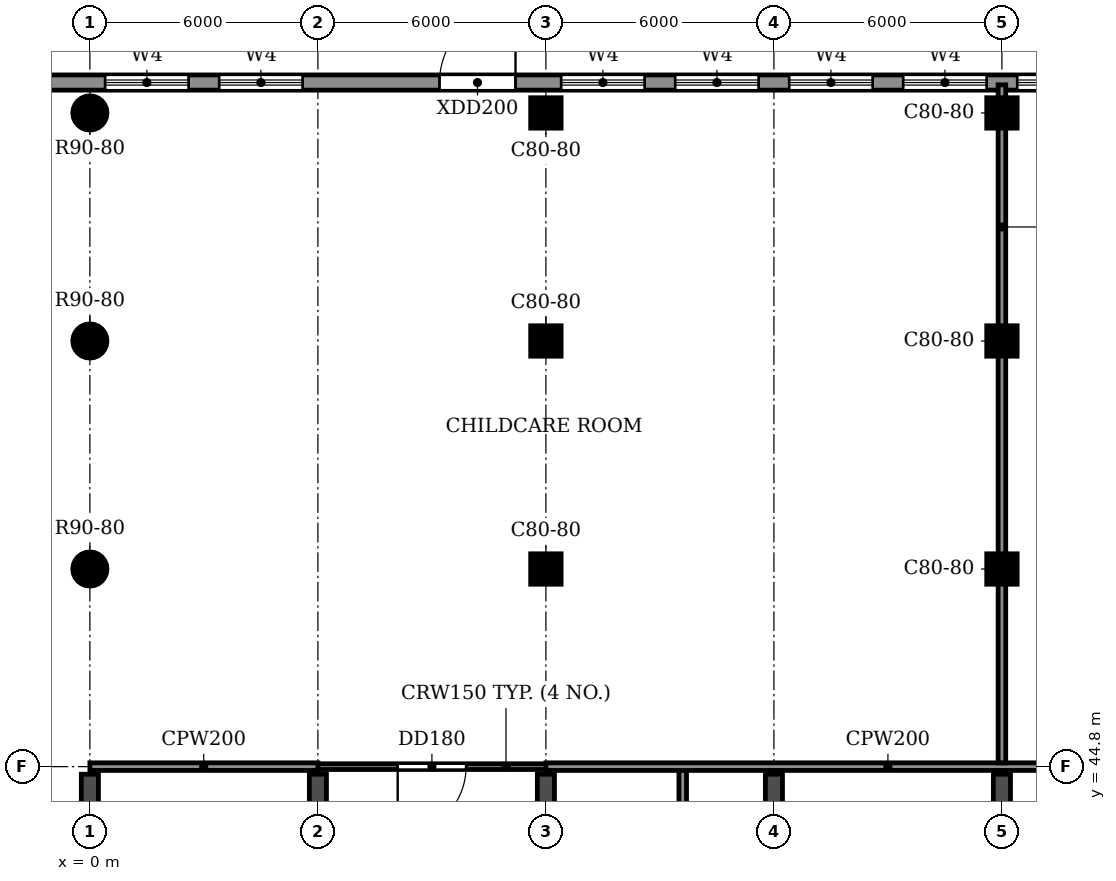
"""IFC4 building model, lengths in metres.
Left out: names, types, materials, properties, quantities, classifications, styles, units other than length and angle.
Written with IfcOpenShell. Run it as: python <this file> out.ifc"""

import sys

from ifc_helpers import new_model, si_unit, direction, frame, frame_2d, origin, origin_2d, place, context, subcontext, project, spatial, rectangle, circle, extrude, source, transform, mapped, element, fill, save


model = new_model("IFC4")
c1 = context("Model", 3, precision=1e-05, world=origin(), true_north=direction((0.0, 1.0)))
c2 = subcontext(c1, "Body", "Model", "MODEL_VIEW")
j1 = project(units=[si_unit("LENGTHUNIT", "METRE"), si_unit("PLANEANGLEUNIT", "RADIAN")], contexts=[c1])
p1 = place(None, origin())
s1 = spatial("IfcSite", under=j1, at=p1, CompositionType="ELEMENT")
p2 = place(p1, origin())
s2 = spatial("IfcBuilding", under=s1, at=p2, CompositionType="ELEMENT")
p3 = place(p2, frame((0.0, 0.0, 10.8)))
s3 = spatial("IfcBuildingStorey", under=s2, at=p3, CompositionType="ELEMENT", Elevation=10.8)
for number, where, z_axis, x_axis in (
    (1, (0.0, 30.55, 0.0), (0.0, 0.0, 1.0), (0.0, 1.0, 0.0)),
    (2, (6.0, 30.55, 0.0), (0.0, 0.0, 1.0), (0.0, 1.0, 0.0)),
    (3, (12.0, 30.55, 0.0), (0.0, 0.0, 1.0), (0.0, 1.0, 0.0)),
    (4, (18.0, 30.55, 0.0), (0.0, 0.0, 1.0), (0.0, 1.0, 0.0)),
    (5, (24.0, 30.55, 0.0), (0.0, 0.0, 1.0), (0.0, 1.0, 0.0)),
):
    element("IfcWall", number, at=place(p3, frame(where, z_axis=z_axis, x_axis=x_axis)), inside=s3, PredefinedType="SHEAR", context=c2, shape_type="SweptSolid", body=[
        extrude(rectangle(XDim=14.05, YDim=0.45, at=frame_2d((7.025, 0.0))), origin(), (0.0, 0.0, 1.0), 3.92),
    ])
m1 = source(origin(), c2, "Body", "SweptSolid", [
    extrude(circle(Radius=0.45, at=origin_2d()), origin(), (0.0, 0.0, 1.0), 3.92),
])
p4 = place(p3, frame((0.0, 62.0, 0.0), z_axis=(0.0, 0.0, 1.0), x_axis=(1.0, 0.0, 0.0)))
e6 = element("IfcColumn", 6, at=p4, inside=s3, PredefinedType="COLUMN", context=c2, shape_type="MappedRepresentation", body=[
    mapped(m1, transform((0.0, 0.0, 0.0))),
])
m2 = source(origin(), c2, "Body", "SweptSolid", [
    extrude(rectangle(XDim=0.8, YDim=0.8, at=origin_2d()), origin(), (0.0, 0.0, 1.0), 3.92),
])
for number, where, z_axis, x_axis in (
    (7, (12.0, 62.0, 0.0), (0.0, 0.0, 1.0), (1.0, 0.0, 0.0)),
    (8, (24.0, 62.0, 0.0), (0.0, 0.0, 1.0), (1.0, 0.0, 0.0)),
):
    element("IfcColumn", number, at=place(p3, frame(where, z_axis=z_axis, x_axis=x_axis)), inside=s3, PredefinedType="COLUMN", context=c2, shape_type="MappedRepresentation", body=[
        mapped(m2, transform((0.0, 0.0, 0.0))),
    ])
p5 = place(p3, frame((0.0, 56.0, 0.0), z_axis=(0.0, 0.0, 1.0), x_axis=(1.0, 0.0, 0.0)))
e9 = element("IfcColumn", 9, at=p5, inside=s3, PredefinedType="COLUMN", context=c2, shape_type="MappedRepresentation", body=[
    mapped(m1, transform((0.0, 0.0, 0.0))),
])
for number, where, z_axis, x_axis in (
    (10, (12.0, 56.0, 0.0), (0.0, 0.0, 1.0), (1.0, 0.0, 0.0)),
    (11, (24.0, 56.0, 0.0), (0.0, 0.0, 1.0), (1.0, 0.0, 0.0)),
):
    element("IfcColumn", number, at=place(p3, frame(where, z_axis=z_axis, x_axis=x_axis)), inside=s3, PredefinedType="COLUMN", context=c2, shape_type="MappedRepresentation", body=[
        mapped(m2, transform((0.0, 0.0, 0.0))),
    ])
p6 = place(p3, frame((0.0, 50.0, 0.0), z_axis=(0.0, 0.0, 1.0), x_axis=(1.0, 0.0, 0.0)))
e12 = element("IfcColumn", 12, at=p6, inside=s3, PredefinedType="COLUMN", context=c2, shape_type="MappedRepresentation", body=[
    mapped(m1, transform((0.0, 0.0, 0.0))),
])
for number, where, z_axis, x_axis in (
    (13, (12.0, 50.0, 0.0), (0.0, 0.0, 1.0), (1.0, 0.0, 0.0)),
    (14, (24.0, 50.0, 0.0), (0.0, 0.0, 1.0), (1.0, 0.0, 0.0)),
):
    element("IfcColumn", number, at=place(p3, frame(where, z_axis=z_axis, x_axis=x_axis)), inside=s3, PredefinedType="COLUMN", context=c2, shape_type="MappedRepresentation", body=[
        mapped(m2, transform((0.0, 0.0, 0.0))),
    ])
p7 = place(p3, frame((105.0, 62.8, 0.0), z_axis=(0.0, 0.0, 1.0), x_axis=(-1.0, 0.0, 0.0)))
e15 = element("IfcWall", 15, at=p7, inside=s3, PredefinedType="STANDARD", context=c2, shape_type="SweptSolid", body=[
    extrude(rectangle(XDim=108.0, YDim=0.4, at=frame_2d((54.0, 0.0))), origin(), (0.0, 0.0, 1.0), 3.92),
])
p8 = place(p7, frame((102.4, 0.0, 0.9)))
e16 = element("IfcOpeningElement", 16, at=p8, cuts=e15, PredefinedType="OPENING", context=c2, shape_type="SweptSolid", body=[
    extrude(rectangle(XDim=2.2, YDim=2.7, at=frame_2d((1.1, 1.35))), frame((0.0, 0.21, 0.0), z_axis=(0.0, -1.0, 0.0), x_axis=(1.0, 0.0, 0.0)), (0.0, 0.0, 1.0), 0.42),
])
p9 = place(p7, frame((99.4, 0.0, 0.9)))
e17 = element("IfcOpeningElement", 17, at=p9, cuts=e15, PredefinedType="OPENING", context=c2, shape_type="SweptSolid", body=[
    extrude(rectangle(XDim=2.2, YDim=2.7, at=frame_2d((1.1, 1.35))), frame((0.0, 0.21, 0.0), z_axis=(0.0, -1.0, 0.0), x_axis=(1.0, 0.0, 0.0)), (0.0, 0.0, 1.0), 0.42),
])
p10 = place(p7, frame((90.4, 0.0, 0.9)))
e18 = element("IfcOpeningElement", 18, at=p10, cuts=e15, PredefinedType="OPENING", context=c2, shape_type="SweptSolid", body=[
    extrude(rectangle(XDim=2.2, YDim=2.7, at=frame_2d((1.1, 1.35))), frame((0.0, 0.21, 0.0), z_axis=(0.0, -1.0, 0.0), x_axis=(1.0, 0.0, 0.0)), (0.0, 0.0, 1.0), 0.42),
])
p11 = place(p7, frame((87.4, 0.0, 0.9)))
e19 = element("IfcOpeningElement", 19, at=p11, cuts=e15, PredefinedType="OPENING", context=c2, shape_type="SweptSolid", body=[
    extrude(rectangle(XDim=2.2, YDim=2.7, at=frame_2d((1.1, 1.35))), frame((0.0, 0.21, 0.0), z_axis=(0.0, -1.0, 0.0), x_axis=(1.0, 0.0, 0.0)), (0.0, 0.0, 1.0), 0.42),
])
p12 = place(p7, frame((84.4, 0.0, 0.9)))
e20 = element("IfcOpeningElement", 20, at=p12, cuts=e15, PredefinedType="OPENING", context=c2, shape_type="SweptSolid", body=[
    extrude(rectangle(XDim=2.2, YDim=2.7, at=frame_2d((1.1, 1.35))), frame((0.0, 0.21, 0.0), z_axis=(0.0, -1.0, 0.0), x_axis=(1.0, 0.0, 0.0)), (0.0, 0.0, 1.0), 0.42),
])
p13 = place(p7, frame((81.4, 0.0, 0.9)))
e21 = element("IfcOpeningElement", 21, at=p13, cuts=e15, PredefinedType="OPENING", context=c2, shape_type="SweptSolid", body=[
    extrude(rectangle(XDim=2.2, YDim=2.7, at=frame_2d((1.1, 1.35))), frame((0.0, 0.21, 0.0), z_axis=(0.0, -1.0, 0.0), x_axis=(1.0, 0.0, 0.0)), (0.0, 0.0, 1.0), 0.42),
])
p14 = place(p7, frame((78.4, 0.0, 0.9)))
e22 = element("IfcOpeningElement", 22, at=p14, cuts=e15, PredefinedType="OPENING", context=c2, shape_type="SweptSolid", body=[
    extrude(rectangle(XDim=2.2, YDim=2.7, at=frame_2d((1.1, 1.35))), frame((0.0, 0.21, 0.0), z_axis=(0.0, -1.0, 0.0), x_axis=(1.0, 0.0, 0.0)), (0.0, 0.0, 1.0), 0.42),
])
p15 = place(p7, frame((75.4, 0.0, 0.9)))
e23 = element("IfcOpeningElement", 23, at=p15, cuts=e15, PredefinedType="OPENING", context=c2, shape_type="SweptSolid", body=[
    extrude(rectangle(XDim=2.2, YDim=2.7, at=frame_2d((1.1, 1.35))), frame((0.0, 0.21, 0.0), z_axis=(0.0, -1.0, 0.0), x_axis=(1.0, 0.0, 0.0)), (0.0, 0.0, 1.0), 0.42),
])
p16 = place(p7, frame((66.4, 0.0, 0.9)))
e24 = element("IfcOpeningElement", 24, at=p16, cuts=e15, PredefinedType="OPENING", context=c2, shape_type="SweptSolid", body=[
    extrude(rectangle(XDim=2.2, YDim=2.7, at=frame_2d((1.1, 1.35))), frame((0.0, 0.21, 0.0), z_axis=(0.0, -1.0, 0.0), x_axis=(1.0, 0.0, 0.0)), (0.0, 0.0, 1.0), 0.42),
])
p17 = place(p7, frame((63.4, 0.0, 0.9)))
e25 = element("IfcOpeningElement", 25, at=p17, cuts=e15, PredefinedType="OPENING", context=c2, shape_type="SweptSolid", body=[
    extrude(rectangle(XDim=2.2, YDim=2.7, at=frame_2d((1.1, 1.35))), frame((0.0, 0.21, 0.0), z_axis=(0.0, -1.0, 0.0), x_axis=(1.0, 0.0, 0.0)), (0.0, 0.0, 1.0), 0.42),
])
p18 = place(p7, frame((60.4, 0.0, 0.9)))
e26 = element("IfcOpeningElement", 26, at=p18, cuts=e15, PredefinedType="OPENING", context=c2, shape_type="SweptSolid", body=[
    extrude(rectangle(XDim=2.2, YDim=2.7, at=frame_2d((1.1, 1.35))), frame((0.0, 0.21, 0.0), z_axis=(0.0, -1.0, 0.0), x_axis=(1.0, 0.0, 0.0)), (0.0, 0.0, 1.0), 0.42),
])
p19 = place(p7, frame((57.4, 0.0, 0.9)))
e27 = element("IfcOpeningElement", 27, at=p19, cuts=e15, PredefinedType="OPENING", context=c2, shape_type="SweptSolid", body=[
    extrude(rectangle(XDim=2.2, YDim=2.7, at=frame_2d((1.1, 1.35))), frame((0.0, 0.21, 0.0), z_axis=(0.0, -1.0, 0.0), x_axis=(1.0, 0.0, 0.0)), (0.0, 0.0, 1.0), 0.42),
])
p20 = place(p7, frame((54.4, 0.0, 0.9)))
e28 = element("IfcOpeningElement", 28, at=p20, cuts=e15, PredefinedType="OPENING", context=c2, shape_type="SweptSolid", body=[
    extrude(rectangle(XDim=2.2, YDim=2.7, at=frame_2d((1.1, 1.35))), frame((0.0, 0.21, 0.0), z_axis=(0.0, -1.0, 0.0), x_axis=(1.0, 0.0, 0.0)), (0.0, 0.0, 1.0), 0.42),
])
p21 = place(p7, frame((51.4, 0.0, 0.9)))
e29 = element("IfcOpeningElement", 29, at=p21, cuts=e15, PredefinedType="OPENING", context=c2, shape_type="SweptSolid", body=[
    extrude(rectangle(XDim=2.2, YDim=2.7, at=frame_2d((1.1, 1.35))), frame((0.0, 0.21, 0.0), z_axis=(0.0, -1.0, 0.0), x_axis=(1.0, 0.0, 0.0)), (0.0, 0.0, 1.0), 0.42),
])
p22 = place(p7, frame((48.4, 0.0, 0.9)))
e30 = element("IfcOpeningElement", 30, at=p22, cuts=e15, PredefinedType="OPENING", context=c2, shape_type="SweptSolid", body=[
    extrude(rectangle(XDim=2.2, YDim=2.7, at=frame_2d((1.1, 1.35))), frame((0.0, 0.21, 0.0), z_axis=(0.0, -1.0, 0.0), x_axis=(1.0, 0.0, 0.0)), (0.0, 0.0, 1.0), 0.42),
])
p23 = place(p7, frame((45.4, 0.0, 0.9)))
e31 = element("IfcOpeningElement", 31, at=p23, cuts=e15, PredefinedType="OPENING", context=c2, shape_type="SweptSolid", body=[
    extrude(rectangle(XDim=2.2, YDim=2.7, at=frame_2d((1.1, 1.35))), frame((0.0, 0.21, 0.0), z_axis=(0.0, -1.0, 0.0), x_axis=(1.0, 0.0, 0.0)), (0.0, 0.0, 1.0), 0.42),
])
p24 = place(p7, frame((42.4, 0.0, 0.9)))
e32 = element("IfcOpeningElement", 32, at=p24, cuts=e15, PredefinedType="OPENING", context=c2, shape_type="SweptSolid", body=[
    extrude(rectangle(XDim=2.2, YDim=2.7, at=frame_2d((1.1, 1.35))), frame((0.0, 0.21, 0.0), z_axis=(0.0, -1.0, 0.0), x_axis=(1.0, 0.0, 0.0)), (0.0, 0.0, 1.0), 0.42),
])
p25 = place(p7, frame((39.4, 0.0, 0.9)))
e33 = element("IfcOpeningElement", 33, at=p25, cuts=e15, PredefinedType="OPENING", context=c2, shape_type="SweptSolid", body=[
    extrude(rectangle(XDim=2.2, YDim=2.7, at=frame_2d((1.1, 1.35))), frame((0.0, 0.21, 0.0), z_axis=(0.0, -1.0, 0.0), x_axis=(1.0, 0.0, 0.0)), (0.0, 0.0, 1.0), 0.42),
])
p26 = place(p7, frame((36.4, 0.0, 0.9)))
e34 = element("IfcOpeningElement", 34, at=p26, cuts=e15, PredefinedType="OPENING", context=c2, shape_type="SweptSolid", body=[
    extrude(rectangle(XDim=2.2, YDim=2.7, at=frame_2d((1.1, 1.35))), frame((0.0, 0.21, 0.0), z_axis=(0.0, -1.0, 0.0), x_axis=(1.0, 0.0, 0.0)), (0.0, 0.0, 1.0), 0.42),
])
p27 = place(p7, frame((33.4, 0.0, 0.9)))
e35 = element("IfcOpeningElement", 35, at=p27, cuts=e15, PredefinedType="OPENING", context=c2, shape_type="SweptSolid", body=[
    extrude(rectangle(XDim=2.2, YDim=2.7, at=frame_2d((1.1, 1.35))), frame((0.0, 0.21, 0.0), z_axis=(0.0, -1.0, 0.0), x_axis=(1.0, 0.0, 0.0)), (0.0, 0.0, 1.0), 0.42),
])
p28 = place(p7, frame((30.4, 0.0, 0.9)))
e36 = element("IfcOpeningElement", 36, at=p28, cuts=e15, PredefinedType="OPENING", context=c2, shape_type="SweptSolid", body=[
    extrude(rectangle(XDim=2.2, YDim=2.7, at=frame_2d((1.1, 1.35))), frame((0.0, 0.21, 0.0), z_axis=(0.0, -1.0, 0.0), x_axis=(1.0, 0.0, 0.0)), (0.0, 0.0, 1.0), 0.42),
])
p29 = place(p7, frame((27.4, 0.0, 0.9)))
e37 = element("IfcOpeningElement", 37, at=p29, cuts=e15, PredefinedType="OPENING", context=c2, shape_type="SweptSolid", body=[
    extrude(rectangle(XDim=2.2, YDim=2.7, at=frame_2d((1.1, 1.35))), frame((0.0, 0.21, 0.0), z_axis=(0.0, -1.0, 0.0), x_axis=(1.0, 0.0, 0.0)), (0.0, 0.0, 1.0), 0.42),
])
p30 = place(p7, frame((24.4, 0.0, 0.9)))
e38 = element("IfcOpeningElement", 38, at=p30, cuts=e15, PredefinedType="OPENING", context=c2, shape_type="SweptSolid", body=[
    extrude(rectangle(XDim=2.2, YDim=2.7, at=frame_2d((1.1, 1.35))), frame((0.0, 0.21, 0.0), z_axis=(0.0, -1.0, 0.0), x_axis=(1.0, 0.0, 0.0)), (0.0, 0.0, 1.0), 0.42),
])
p31 = place(p7, frame((21.4, 0.0, 0.9)))
e39 = element("IfcOpeningElement", 39, at=p31, cuts=e15, PredefinedType="OPENING", context=c2, shape_type="SweptSolid", body=[
    extrude(rectangle(XDim=2.2, YDim=2.7, at=frame_2d((1.1, 1.35))), frame((0.0, 0.21, 0.0), z_axis=(0.0, -1.0, 0.0), x_axis=(1.0, 0.0, 0.0)), (0.0, 0.0, 1.0), 0.42),
])
p32 = place(p7, frame((18.4, 0.0, 0.9)))
e40 = element("IfcOpeningElement", 40, at=p32, cuts=e15, PredefinedType="OPENING", context=c2, shape_type="SweptSolid", body=[
    extrude(rectangle(XDim=2.2, YDim=2.7, at=frame_2d((1.1, 1.35))), frame((0.0, 0.21, 0.0), z_axis=(0.0, -1.0, 0.0), x_axis=(1.0, 0.0, 0.0)), (0.0, 0.0, 1.0), 0.42),
])
p33 = place(p7, frame((15.4, 0.0, 0.9)))
e41 = element("IfcOpeningElement", 41, at=p33, cuts=e15, PredefinedType="OPENING", context=c2, shape_type="SweptSolid", body=[
    extrude(rectangle(XDim=2.2, YDim=2.7, at=frame_2d((1.1, 1.35))), frame((0.0, 0.21, 0.0), z_axis=(0.0, -1.0, 0.0), x_axis=(1.0, 0.0, 0.0)), (0.0, 0.0, 1.0), 0.42),
])
p34 = place(p7, frame((12.4, 0.0, 0.9)))
e42 = element("IfcOpeningElement", 42, at=p34, cuts=e15, PredefinedType="OPENING", context=c2, shape_type="SweptSolid", body=[
    extrude(rectangle(XDim=2.2, YDim=2.7, at=frame_2d((1.1, 1.35))), frame((0.0, 0.21, 0.0), z_axis=(0.0, -1.0, 0.0), x_axis=(1.0, 0.0, 0.0)), (0.0, 0.0, 1.0), 0.42),
])
p35 = place(p7, frame((9.4, 0.0, 0.9)))
e43 = element("IfcOpeningElement", 43, at=p35, cuts=e15, PredefinedType="OPENING", context=c2, shape_type="SweptSolid", body=[
    extrude(rectangle(XDim=2.2, YDim=2.7, at=frame_2d((1.1, 1.35))), frame((0.0, 0.21, 0.0), z_axis=(0.0, -1.0, 0.0), x_axis=(1.0, 0.0, 0.0)), (0.0, 0.0, 1.0), 0.42),
])
p36 = place(p7, frame((93.8, 0.0, 0.0)))
e44 = element("IfcOpeningElement", 44, at=p36, cuts=e15, PredefinedType="OPENING", context=c2, shape_type="SweptSolid", body=[
    extrude(rectangle(XDim=2.0, YDim=2.4, at=frame_2d((1.0, 1.2))), frame((0.0, 0.21, 0.0), z_axis=(0.0, -1.0, 0.0), x_axis=(1.0, 0.0, 0.0)), (0.0, 0.0, 1.0), 0.42),
])
p37 = place(p7, frame((71.63, 0.0, 0.0)))
e45 = element("IfcOpeningElement", 45, at=p37, cuts=e15, PredefinedType="OPENING", context=c2, shape_type="SweptSolid", body=[
    extrude(rectangle(XDim=2.0, YDim=2.4, at=frame_2d((1.0, 1.2))), frame((0.0, 0.21, 0.0), z_axis=(0.0, -1.0, 0.0), x_axis=(1.0, 0.0, 0.0)), (0.0, 0.0, 1.0), 0.42),
])
p38 = place(p3, frame((6.0, 44.8, 0.0), z_axis=(0.0, 0.0, 1.0), x_axis=(1.0, 0.0, 0.0)))
e46 = element("IfcWall", 46, at=p38, inside=s3, PredefinedType="PARTITIONING", context=c2, shape_type="SweptSolid", body=[
    extrude(rectangle(XDim=6.0, YDim=0.15, at=frame_2d((3.0, 0.0))), origin(), (0.0, 0.0, 1.0), 3.92),
])
p39 = place(p38, frame((2.1, 0.0, 0.0)))
e47 = element("IfcOpeningElement", 47, at=p39, cuts=e46, PredefinedType="OPENING", context=c2, shape_type="SweptSolid", body=[
    extrude(rectangle(XDim=1.8, YDim=2.1, at=frame_2d((0.9, 1.05))), frame((0.0, 0.085, 0.0), z_axis=(0.0, -1.0, 0.0), x_axis=(1.0, 0.0, 0.0)), (0.0, 0.0, 1.0), 0.17),
])
p40 = place(p3, frame((0.0, 44.8, 0.0), z_axis=(0.0, 0.0, 1.0), x_axis=(1.0, 0.0, 0.0)))
e48 = element("IfcWall", 48, at=p40, inside=s3, PredefinedType="PARTITIONING", context=c2, shape_type="SweptSolid", body=[
    extrude(rectangle(XDim=6.0, YDim=0.2, at=frame_2d((3.0, 0.0))), origin(), (0.0, 0.0, 1.0), 3.92),
])
p41 = place(p3, frame((12.0, 44.8, 0.0), z_axis=(0.0, 0.0, 1.0), x_axis=(1.0, 0.0, 0.0)))
e49 = element("IfcWall", 49, at=p41, inside=s3, PredefinedType="PARTITIONING", context=c2, shape_type="SweptSolid", body=[
    extrude(rectangle(XDim=18.0, YDim=0.2, at=frame_2d((9.0, 0.0))), origin(), (0.0, 0.0, 1.0), 3.92),
])
p42 = place(p3, frame((15.6, 32.875, 0.0), z_axis=(0.0, 0.0, 1.0), x_axis=(0.0, 1.0, 0.0)))
e50 = element("IfcWall", 50, at=p42, inside=s3, PredefinedType="PARTITIONING", context=c2, shape_type="SweptSolid", body=[
    extrude(rectangle(XDim=11.825, YDim=0.2, at=frame_2d((5.913, 0.0))), origin(), (0.0, 0.0, 1.0), 3.92),
])
p43 = place(p3, frame((24.0, 44.9, 0.0), z_axis=(0.0, 0.0, 1.0), x_axis=(0.0, 1.0, 0.0)))
e51 = element("IfcWall", 51, at=p43, inside=s3, PredefinedType="PARTITIONING", context=c2, shape_type="SweptSolid", body=[
    extrude(rectangle(XDim=17.84, YDim=0.2, at=frame_2d((8.92, 0.0))), origin(), (0.0, 0.0, 1.0), 3.92),
])
p44 = place(p8, origin())
e52 = element("IfcWindow", 52, at=p44, inside=s3, PartitioningType="DOUBLE_PANEL_HORIZONTAL", PredefinedType="WINDOW", context=c2, shape_type="SweptSolid", body=[
    extrude(rectangle(XDim=2.2, YDim=2.7, at=frame_2d((1.1, 1.35))), frame((0.0, 0.03, 0.0), z_axis=(0.0, -1.0, 0.0), x_axis=(1.0, 0.0, 0.0)), (0.0, 0.0, 1.0), 0.06),
])
fill(e16, e52)
p45 = place(p9, origin())
e53 = element("IfcWindow", 53, at=p45, inside=s3, PartitioningType="DOUBLE_PANEL_HORIZONTAL", PredefinedType="WINDOW", context=c2, shape_type="SweptSolid", body=[
    extrude(rectangle(XDim=2.2, YDim=2.7, at=frame_2d((1.1, 1.35))), frame((0.0, 0.03, 0.0), z_axis=(0.0, -1.0, 0.0), x_axis=(1.0, 0.0, 0.0)), (0.0, 0.0, 1.0), 0.06),
])
fill(e17, e53)
p46 = place(p10, origin())
e54 = element("IfcWindow", 54, at=p46, inside=s3, PartitioningType="DOUBLE_PANEL_HORIZONTAL", PredefinedType="WINDOW", context=c2, shape_type="SweptSolid", body=[
    extrude(rectangle(XDim=2.2, YDim=2.7, at=frame_2d((1.1, 1.35))), frame((0.0, 0.03, 0.0), z_axis=(0.0, -1.0, 0.0), x_axis=(1.0, 0.0, 0.0)), (0.0, 0.0, 1.0), 0.06),
])
fill(e18, e54)
p47 = place(p11, origin())
e55 = element("IfcWindow", 55, at=p47, inside=s3, PartitioningType="DOUBLE_PANEL_HORIZONTAL", PredefinedType="WINDOW", context=c2, shape_type="SweptSolid", body=[
    extrude(rectangle(XDim=2.2, YDim=2.7, at=frame_2d((1.1, 1.35))), frame((0.0, 0.03, 0.0), z_axis=(0.0, -1.0, 0.0), x_axis=(1.0, 0.0, 0.0)), (0.0, 0.0, 1.0), 0.06),
])
fill(e19, e55)
p48 = place(p12, origin())
e56 = element("IfcWindow", 56, at=p48, inside=s3, PartitioningType="DOUBLE_PANEL_HORIZONTAL", PredefinedType="WINDOW", context=c2, shape_type="SweptSolid", body=[
    extrude(rectangle(XDim=2.2, YDim=2.7, at=frame_2d((1.1, 1.35))), frame((0.0, 0.03, 0.0), z_axis=(0.0, -1.0, 0.0), x_axis=(1.0, 0.0, 0.0)), (0.0, 0.0, 1.0), 0.06),
])
fill(e20, e56)
p49 = place(p13, origin())
e57 = element("IfcWindow", 57, at=p49, inside=s3, PartitioningType="DOUBLE_PANEL_HORIZONTAL", PredefinedType="WINDOW", context=c2, shape_type="SweptSolid", body=[
    extrude(rectangle(XDim=2.2, YDim=2.7, at=frame_2d((1.1, 1.35))), frame((0.0, 0.03, 0.0), z_axis=(0.0, -1.0, 0.0), x_axis=(1.0, 0.0, 0.0)), (0.0, 0.0, 1.0), 0.06),
])
fill(e21, e57)
p50 = place(p14, origin())
e58 = element("IfcWindow", 58, at=p50, inside=s3, PartitioningType="DOUBLE_PANEL_HORIZONTAL", PredefinedType="WINDOW", context=c2, shape_type="SweptSolid", body=[
    extrude(rectangle(XDim=2.2, YDim=2.7, at=frame_2d((1.1, 1.35))), frame((0.0, 0.03, 0.0), z_axis=(0.0, -1.0, 0.0), x_axis=(1.0, 0.0, 0.0)), (0.0, 0.0, 1.0), 0.06),
])
fill(e22, e58)
p51 = place(p39, frame((1.8, 0.0, 0.0), z_axis=(0.0, 0.0, 1.0), x_axis=(-1.0, 0.0, 0.0)))
e59 = element("IfcDoor", 59, at=p51, inside=s3, OperationType="DOUBLE_DOOR_SINGLE_SWING", PredefinedType="DOOR", context=c2, shape_type="SweptSolid", body=[
    extrude(rectangle(XDim=1.8, YDim=2.1, at=frame_2d((0.9, 1.05))), frame((0.0, 0.025, 0.0), z_axis=(0.0, -1.0, 0.0), x_axis=(1.0, 0.0, 0.0)), (0.0, 0.0, 1.0), 0.05),
])
fill(e47, e59)
p52 = place(p36, frame((2.0, 0.0, 0.0), z_axis=(0.0, 0.0, 1.0), x_axis=(-1.0, 0.0, 0.0)))
e60 = element("IfcDoor", 60, at=p52, inside=s3, OperationType="DOUBLE_DOOR_SINGLE_SWING", PredefinedType="DOOR", context=c2, shape_type="SweptSolid", body=[
    extrude(rectangle(XDim=2.0, YDim=2.4, at=frame_2d((1.0, 1.2))), frame((0.0, 0.025, 0.0), z_axis=(0.0, -1.0, 0.0), x_axis=(1.0, 0.0, 0.0)), (0.0, 0.0, 1.0), 0.05),
])
fill(e44, e60)
save(model, sys.argv[1])
